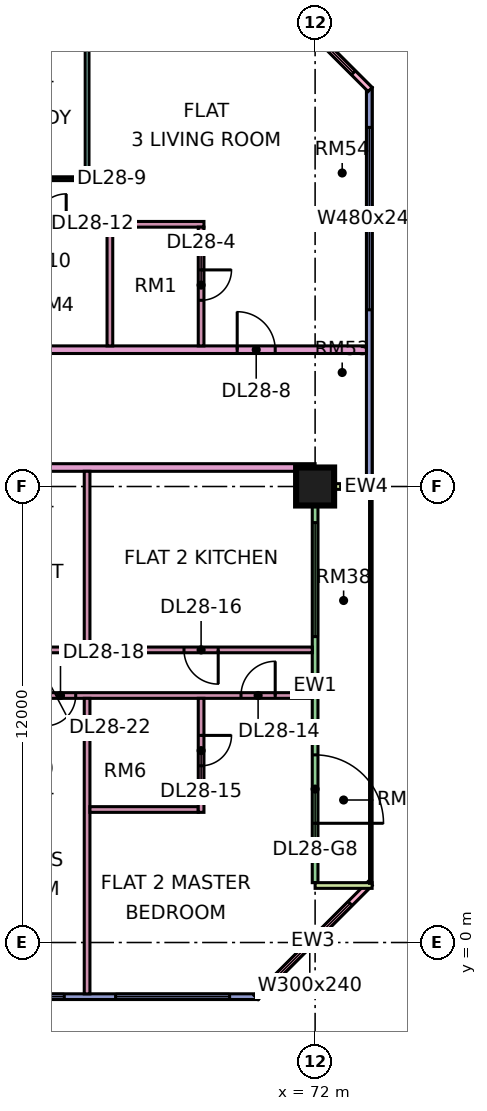
"""IFC4 building model, lengths in metres.
Left out: names, types, materials, properties, quantities, classifications, styles, units other than length and angle.
Written with IfcOpenShell. Run it as: python <this file> out.ifc"""

import sys

from ifc_helpers import new_model, si_unit, direction, frame, frame_2d, origin, origin_2d, place, context, subcontext, project, spatial, rectangle, extrude, element, fill, save


model = new_model("IFC4")
c1 = context("Model", 3, precision=1e-05, world=origin(), true_north=direction((0.0, 1.0)))
c2 = subcontext(c1, "Body", "Model", "MODEL_VIEW")
j1 = project(units=[si_unit("LENGTHUNIT", "METRE"), si_unit("PLANEANGLEUNIT", "RADIAN")], contexts=[c1])
p1 = place(None, origin())
s1 = spatial("IfcSite", under=j1, at=p1, CompositionType="ELEMENT")
p2 = place(p1, origin())
s2 = spatial("IfcBuilding", under=s1, at=p2, CompositionType="ELEMENT")
p3 = place(p2, frame((0.0, 0.0, 121.9)))
s3 = spatial("IfcBuildingStorey", under=s2, at=p3, CompositionType="ELEMENT", Elevation=121.9)
p4 = place(p3, frame((72.0, 12.0, 0.0), z_axis=(0.0, 0.0, 1.0), x_axis=(1.0, 0.0, 0.0)))
e1 = element("IfcColumn", 1, at=p4, inside=s3, PredefinedType="COLUMN", context=c2, shape_type="SweptSolid", body=[
    extrude(rectangle(XDim=1.0, YDim=1.0, at=origin_2d()), origin(), (0.0, 0.0, 1.0), 3.75),
])
p5 = place(p3, frame((60.075, -1.425, 0.0), z_axis=(0.0, 0.0, 1.0), x_axis=(1.0, 0.0, 0.0)))
e2 = element("IfcWall", 2, at=p5, inside=s3, PredefinedType="SOLIDWALL", context=c2, shape_type="SweptSolid", body=[
    extrude(rectangle(XDim=10.425, YDim=0.15, at=frame_2d((5.212, 0.0))), origin(), (0.0, 0.0, 1.0), 3.35),
])
p6 = place(p5, frame((0.562, 0.0, 0.45)))
e3 = element("IfcOpeningElement", 3, at=p6, cuts=e2, PredefinedType="OPENING", context=c2, shape_type="SweptSolid", body=[
    extrude(rectangle(XDim=1.8, YDim=2.4, at=frame_2d((0.9, 1.2))), frame((0.0, 0.085, 0.0), z_axis=(0.0, -1.0, 0.0), x_axis=(1.0, 0.0, 0.0)), (0.0, 0.0, 1.0), 0.17),
])
p7 = place(p5, frame((3.525, 0.0, 0.45)))
e4 = element("IfcOpeningElement", 4, at=p7, cuts=e2, PredefinedType="OPENING", context=c2, shape_type="SweptSolid", body=[
    extrude(rectangle(XDim=1.8, YDim=2.4, at=frame_2d((0.9, 1.2))), frame((0.0, 0.085, 0.0), z_axis=(0.0, -1.0, 0.0), x_axis=(1.0, 0.0, 0.0)), (0.0, 0.0, 1.0), 0.17),
])
p8 = place(p5, frame((6.675, 0.0, 0.45)))
e5 = element("IfcOpeningElement", 5, at=p8, cuts=e2, PredefinedType="OPENING", context=c2, shape_type="SweptSolid", body=[
    extrude(rectangle(XDim=3.0, YDim=2.4, at=frame_2d((1.5, 1.2))), frame((0.0, 0.085, 0.0), z_axis=(0.0, -1.0, 0.0), x_axis=(1.0, 0.0, 0.0)), (0.0, 0.0, 1.0), 0.17),
])
p9 = place(p3, frame((70.447, -1.447, 0.0), z_axis=(0.0, 0.0, 1.0), x_axis=(0.707106781187, 0.707106781187, 0.0)))
e6 = element("IfcWall", 6, at=p9, inside=s3, PredefinedType="SOLIDWALL", context=c2, shape_type="SweptSolid", body=[
    extrude(rectangle(XDim=4.243, YDim=0.15, at=frame_2d((2.121, 0.0))), origin(), (0.0, 0.0, 1.0), 3.35),
])
p10 = place(p9, frame((0.498, 0.0, 0.45)))
e7 = element("IfcOpeningElement", 7, at=p10, cuts=e6, PredefinedType="OPENING", context=c2, shape_type="SweptSolid", body=[
    extrude(rectangle(XDim=3.0, YDim=2.4, at=frame_2d((1.5, 1.2))), frame((0.0, 0.085, 0.0), z_axis=(0.0, -1.0, 0.0), x_axis=(1.0, 0.0, 0.0)), (0.0, 0.0, 1.0), 0.17),
])
p11 = place(p3, frame((72.0, 1.575, 0.0), z_axis=(0.0, 0.0, 1.0), x_axis=(0.0, 1.0, 0.0)))
e8 = element("IfcWall", 8, at=p11, inside=s3, PredefinedType="SOLIDWALL", context=c2, shape_type="SweptSolid", body=[
    extrude(rectangle(XDim=10.35, YDim=0.15, at=frame_2d((5.175, 0.0))), origin(), (0.0, 0.0, 1.0), 3.35),
])
p12 = place(p11, frame((1.562, 0.0, 0.0)))
e9 = element("IfcOpeningElement", 9, at=p12, cuts=e8, PredefinedType="OPENING", context=c2, shape_type="SweptSolid", body=[
    extrude(rectangle(XDim=1.8, YDim=2.4, at=frame_2d((0.9, 1.2))), frame((0.0, 0.085, 0.0), z_axis=(0.0, -1.0, 0.0), x_axis=(1.0, 0.0, 0.0)), (0.0, 0.0, 1.0), 0.17),
])
p13 = place(p11, frame((6.475, 0.0, 0.45)))
e10 = element("IfcOpeningElement", 10, at=p13, cuts=e8, PredefinedType="OPENING", context=c2, shape_type="SweptSolid", body=[
    extrude(rectangle(XDim=3.0, YDim=2.4, at=frame_2d((1.5, 1.2))), frame((0.0, 0.085, 0.0), z_axis=(0.0, -1.0, 0.0), x_axis=(1.0, 0.0, 0.0)), (0.0, 0.0, 1.0), 0.17),
])
for number, where, z_axis, x_axis in (
    (11, (73.5, 1.5, 0.0), (0.0, 0.0, 1.0), (-1.0, 0.0, 0.0)),
    (12, (73.5, 12.0, 0.0), (0.0, 0.0, 1.0), (-1.0, 0.0, 0.0)),
):
    element("IfcWall", number, at=place(p3, frame(where, z_axis=z_axis, x_axis=x_axis)), inside=s3, PredefinedType="SOLIDWALL", context=c2, shape_type="SweptSolid", body=[
        extrude(rectangle(XDim=1.5, YDim=0.15, at=frame_2d((0.75, 0.0))), origin(), (0.0, 0.0, 1.0), 3.35),
    ])
p14 = place(p3, frame((73.425, 12.075, 0.0), z_axis=(0.0, 0.0, 1.0), x_axis=(0.0, 1.0, 0.0)))
e13 = element("IfcWall", 13, at=p14, inside=s3, PredefinedType="SOLIDWALL", context=c2, shape_type="SweptSolid", body=[
    extrude(rectangle(XDim=10.425, YDim=0.15, at=frame_2d((5.212, 0.0))), origin(), (0.0, 0.0, 1.0), 3.35),
])
p15 = place(p14, frame((4.575, 0.0, 0.45)))
e14 = element("IfcOpeningElement", 14, at=p15, cuts=e13, PredefinedType="OPENING", context=c2, shape_type="SweptSolid", body=[
    extrude(rectangle(XDim=4.8, YDim=2.4, at=frame_2d((2.4, 1.2))), frame((0.0, 0.085, 0.0), z_axis=(0.0, -1.0, 0.0), x_axis=(1.0, 0.0, 0.0)), (0.0, 0.0, 1.0), 0.17),
])
p16 = place(p3, frame((73.447, 22.447, 0.0), z_axis=(0.0, 0.0, 1.0), x_axis=(-0.707106781187, 0.707106781187, 0.0)))
e15 = element("IfcWall", 15, at=p16, inside=s3, PredefinedType="SOLIDWALL", context=c2, shape_type="SweptSolid", body=[
    extrude(rectangle(XDim=4.243, YDim=0.15, at=frame_2d((2.121, 0.0))), origin(), (0.0, 0.0, 1.0), 3.35),
])
p17 = place(p16, frame((0.621, 0.0, 0.45)))
e16 = element("IfcOpeningElement", 16, at=p17, cuts=e15, PredefinedType="OPENING", context=c2, shape_type="SweptSolid", body=[
    extrude(rectangle(XDim=3.0, YDim=2.4, at=frame_2d((1.5, 1.2))), frame((0.0, 0.085, 0.0), z_axis=(0.0, -1.0, 0.0), x_axis=(1.0, 0.0, 0.0)), (0.0, 0.0, 1.0), 0.17),
])
p18 = place(p3, frame((40.65, 12.5, 0.0), z_axis=(0.0, 0.0, 1.0), x_axis=(1.0, 0.0, 0.0)))
e17 = element("IfcWall", 17, at=p18, inside=s3, PredefinedType="PARTITIONING", context=c2, shape_type="SweptSolid", body=[
    extrude(rectangle(XDim=31.35, YDim=0.2, at=frame_2d((15.675, 0.0))), origin(), (0.0, 0.0, 1.0), 3.35),
])
p19 = place(p18, frame((20.1, 0.0, 0.0)))
e18 = element("IfcOpeningElement", 18, at=p19, cuts=e17, PredefinedType="OPENING", context=c2, shape_type="SweptSolid", body=[
    extrude(rectangle(XDim=1.0, YDim=2.1, at=frame_2d((0.5, 1.05))), frame((0.0, 0.11, 0.0), z_axis=(0.0, -1.0, 0.0), x_axis=(1.0, 0.0, 0.0)), (0.0, 0.0, 1.0), 0.22),
])
p20 = place(p18, frame((1.05, 0.0, 0.0)))
e19 = element("IfcOpeningElement", 19, at=p20, cuts=e17, PredefinedType="OPENING", context=c2, shape_type="SweptSolid", body=[
    extrude(rectangle(XDim=1.0, YDim=2.1, at=frame_2d((0.5, 1.05))), frame((0.0, 0.11, 0.0), z_axis=(0.0, -1.0, 0.0), x_axis=(1.0, 0.0, 0.0)), (0.0, 0.0, 1.0), 0.22),
])
p21 = place(p3, frame((51.225, 15.6, 0.0), z_axis=(0.0, 0.0, 1.0), x_axis=(1.0, 0.0, 0.0)))
e20 = element("IfcWall", 20, at=p21, inside=s3, PredefinedType="PARTITIONING", context=c2, shape_type="SweptSolid", body=[
    extrude(rectangle(XDim=22.125, YDim=0.2, at=frame_2d((11.062, 0.0))), origin(), (0.0, 0.0, 1.0), 3.35),
])
p22 = place(p21, frame((18.725, 0.0, 0.0)))
e21 = element("IfcOpeningElement", 21, at=p22, cuts=e20, PredefinedType="OPENING", context=c2, shape_type="SweptSolid", body=[
    extrude(rectangle(XDim=1.0, YDim=2.1, at=frame_2d((0.5, 1.05))), frame((0.0, 0.11, 0.0), z_axis=(0.0, -1.0, 0.0), x_axis=(1.0, 0.0, 0.0)), (0.0, 0.0, 1.0), 0.22),
])
p23 = place(p21, frame((0.875, 0.0, 0.0)))
e22 = element("IfcOpeningElement", 22, at=p23, cuts=e20, PredefinedType="OPENING", context=c2, shape_type="SweptSolid", body=[
    extrude(rectangle(XDim=1.0, YDim=2.1, at=frame_2d((0.5, 1.05))), frame((0.0, 0.11, 0.0), z_axis=(0.0, -1.0, 0.0), x_axis=(1.0, 0.0, 0.0)), (0.0, 0.0, 1.0), 0.22),
])
p24 = place(p3, frame((54.1, 18.9, 0.0), z_axis=(0.0, 0.0, 1.0), x_axis=(1.0, 0.0, 0.0)))
e23 = element("IfcWall", 23, at=p24, inside=s3, PredefinedType="PARTITIONING", context=c2, shape_type="SweptSolid", body=[
    extrude(rectangle(XDim=14.975, YDim=0.15, at=frame_2d((7.487, 0.0))), origin(), (0.0, 0.0, 1.0), 3.35),
])
p25 = place(p24, frame((2.3, 0.0, 0.0)))
e24 = element("IfcOpeningElement", 24, at=p25, cuts=e23, PredefinedType="OPENING", context=c2, shape_type="SweptSolid", body=[
    extrude(rectangle(XDim=0.9, YDim=2.1, at=frame_2d((0.45, 1.05))), frame((0.0, 0.085, 0.0), z_axis=(0.0, -1.0, 0.0), x_axis=(1.0, 0.0, 0.0)), (0.0, 0.0, 1.0), 0.17),
])
p26 = place(p24, frame((7.1, 0.0, 0.0)))
e25 = element("IfcOpeningElement", 25, at=p26, cuts=e23, PredefinedType="OPENING", context=c2, shape_type="SweptSolid", body=[
    extrude(rectangle(XDim=0.8, YDim=2.1, at=frame_2d((0.4, 1.05))), frame((0.0, 0.085, 0.0), z_axis=(0.0, -1.0, 0.0), x_axis=(1.0, 0.0, 0.0)), (0.0, 0.0, 1.0), 0.17),
])
p27 = place(p24, frame((10.55, 0.0, 0.0)))
e26 = element("IfcOpeningElement", 26, at=p27, cuts=e23, PredefinedType="OPENING", context=c2, shape_type="SweptSolid", body=[
    extrude(rectangle(XDim=0.8, YDim=2.1, at=frame_2d((0.4, 1.05))), frame((0.0, 0.085, 0.0), z_axis=(0.0, -1.0, 0.0), x_axis=(1.0, 0.0, 0.0)), (0.0, 0.0, 1.0), 0.17),
])
p28 = place(p3, frame((54.1, 20.1, 0.0), z_axis=(0.0, 0.0, 1.0), x_axis=(1.0, 0.0, 0.0)))
e27 = element("IfcWall", 27, at=p28, inside=s3, PredefinedType="PARTITIONING", context=c2, shape_type="SweptSolid", body=[
    extrude(rectangle(XDim=11.95, YDim=0.1, at=frame_2d((5.975, 0.0))), origin(), (0.0, 0.0, 1.0), 3.35),
])
p29 = place(p28, frame((0.95, 0.0, 0.0)))
e28 = element("IfcOpeningElement", 28, at=p29, cuts=e27, PredefinedType="OPENING", context=c2, shape_type="SweptSolid", body=[
    extrude(rectangle(XDim=0.9, YDim=2.1, at=frame_2d((0.45, 1.05))), frame((0.0, 0.06, 0.0), z_axis=(0.0, -1.0, 0.0), x_axis=(1.0, 0.0, 0.0)), (0.0, 0.0, 1.0), 0.12),
])
p30 = place(p28, frame((3.95, 0.0, 0.0)))
e29 = element("IfcOpeningElement", 29, at=p30, cuts=e27, PredefinedType="OPENING", context=c2, shape_type="SweptSolid", body=[
    extrude(rectangle(XDim=0.9, YDim=2.1, at=frame_2d((0.45, 1.05))), frame((0.0, 0.06, 0.0), z_axis=(0.0, -1.0, 0.0), x_axis=(1.0, 0.0, 0.0)), (0.0, 0.0, 1.0), 0.12),
])
p31 = place(p28, frame((6.55, 0.0, 0.0)))
e30 = element("IfcOpeningElement", 30, at=p31, cuts=e27, PredefinedType="OPENING", context=c2, shape_type="SweptSolid", body=[
    extrude(rectangle(XDim=1.6, YDim=2.1, at=frame_2d((0.8, 1.05))), frame((0.0, 0.06, 0.0), z_axis=(0.0, -1.0, 0.0), x_axis=(1.0, 0.0, 0.0)), (0.0, 0.0, 1.0), 0.12),
])
p32 = place(p28, frame((9.95, 0.0, 0.0)))
e31 = element("IfcOpeningElement", 31, at=p32, cuts=e27, PredefinedType="OPENING", context=c2, shape_type="SweptSolid", body=[
    extrude(rectangle(XDim=0.9, YDim=2.1, at=frame_2d((0.45, 1.05))), frame((0.0, 0.06, 0.0), z_axis=(0.0, -1.0, 0.0), x_axis=(1.0, 0.0, 0.0)), (0.0, 0.0, 1.0), 0.12),
])
p33 = place(p3, frame((59.95, 6.5, 0.0), z_axis=(0.0, 0.0, 1.0), x_axis=(1.0, 0.0, 0.0)))
e32 = element("IfcWall", 32, at=p33, inside=s3, PredefinedType="PARTITIONING", context=c2, shape_type="SweptSolid", body=[
    extrude(rectangle(XDim=11.976, YDim=0.15, at=frame_2d((5.988, 0.0))), origin(), (0.0, 0.0, 1.0), 3.35),
])
p34 = place(p33, frame((10.1, 0.0, 0.0)))
e33 = element("IfcOpeningElement", 33, at=p34, cuts=e32, PredefinedType="OPENING", context=c2, shape_type="SweptSolid", body=[
    extrude(rectangle(XDim=0.9, YDim=2.1, at=frame_2d((0.45, 1.05))), frame((0.0, 0.085, 0.0), z_axis=(0.0, -1.0, 0.0), x_axis=(1.0, 0.0, 0.0)), (0.0, 0.0, 1.0), 0.17),
])
p35 = place(p33, frame((4.95, 0.0, 0.0)))
e34 = element("IfcOpeningElement", 34, at=p35, cuts=e32, PredefinedType="OPENING", context=c2, shape_type="SweptSolid", body=[
    extrude(rectangle(XDim=0.8, YDim=2.1, at=frame_2d((0.4, 1.05))), frame((0.0, 0.085, 0.0), z_axis=(0.0, -1.0, 0.0), x_axis=(1.0, 0.0, 0.0)), (0.0, 0.0, 1.0), 0.17),
])
p36 = place(p33, frame((0.8, 0.0, 0.0)))
e35 = element("IfcOpeningElement", 35, at=p36, cuts=e32, PredefinedType="OPENING", context=c2, shape_type="SweptSolid", body=[
    extrude(rectangle(XDim=1.6, YDim=2.1, at=frame_2d((0.8, 1.05))), frame((0.0, 0.085, 0.0), z_axis=(0.0, -1.0, 0.0), x_axis=(1.0, 0.0, 0.0)), (0.0, 0.0, 1.0), 0.17),
])
p37 = place(p3, frame((62.925, 7.7, 0.0), z_axis=(0.0, 0.0, 1.0), x_axis=(1.0, 0.0, 0.0)))
e36 = element("IfcWall", 36, at=p37, inside=s3, PredefinedType="PARTITIONING", context=c2, shape_type="SweptSolid", body=[
    extrude(rectangle(XDim=9.001, YDim=0.15, at=frame_2d((4.5, 0.0))), origin(), (0.0, 0.0, 1.0), 3.35),
])
p38 = place(p37, frame((5.625, 0.0, 0.0)))
e37 = element("IfcOpeningElement", 37, at=p38, cuts=e36, PredefinedType="OPENING", context=c2, shape_type="SweptSolid", body=[
    extrude(rectangle(XDim=0.9, YDim=2.1, at=frame_2d((0.45, 1.05))), frame((0.0, 0.085, 0.0), z_axis=(0.0, -1.0, 0.0), x_axis=(1.0, 0.0, 0.0)), (0.0, 0.0, 1.0), 0.17),
])
p39 = place(p37, frame((1.225, 0.0, 0.0)))
e38 = element("IfcOpeningElement", 38, at=p39, cuts=e36, PredefinedType="OPENING", context=c2, shape_type="SweptSolid", body=[
    extrude(rectangle(XDim=0.8, YDim=2.1, at=frame_2d((0.4, 1.05))), frame((0.0, 0.085, 0.0), z_axis=(0.0, -1.0, 0.0), x_axis=(1.0, 0.0, 0.0)), (0.0, 0.0, 1.0), 0.17),
])
p40 = place(p3, frame((66.0, -1.351, 0.0), z_axis=(0.0, 0.0, 1.0), x_axis=(0.0, 1.0, 0.0)))
e39 = element("IfcWall", 39, at=p40, inside=s3, PredefinedType="PARTITIONING", context=c2, shape_type="SweptSolid", body=[
    extrude(rectangle(XDim=7.776, YDim=0.15, at=frame_2d((3.888, 0.0))), origin(), (0.0, 0.0, 1.0), 3.35),
])
p41 = place(p3, frame((66.0, 7.775, 0.0), z_axis=(0.0, 0.0, 1.0), x_axis=(0.0, 1.0, 0.0)))
e40 = element("IfcWall", 40, at=p41, inside=s3, PredefinedType="PARTITIONING", context=c2, shape_type="SweptSolid", body=[
    extrude(rectangle(XDim=4.625, YDim=0.15, at=frame_2d((2.312, 0.0))), origin(), (0.0, 0.0, 1.0), 3.35),
])
p42 = place(p3, frame((66.0, 20.15, 0.0), z_axis=(0.0, 0.0, 1.0), x_axis=(0.0, 1.0, 0.0)))
e41 = element("IfcWall", 41, at=p42, inside=s3, PredefinedType="PARTITIONING", context=c2, shape_type="SweptSolid", body=[
    extrude(rectangle(XDim=5.2, YDim=0.1, at=frame_2d((2.6, 0.0))), origin(), (0.0, 0.0, 1.0), 3.35),
])
p43 = place(p3, frame((66.075, 3.5, 0.0), z_axis=(0.0, 0.0, 1.0), x_axis=(1.0, 0.0, 0.0)))
e42 = element("IfcWall", 42, at=p43, inside=s3, PredefinedType="PARTITIONING", context=c2, shape_type="SweptSolid", body=[
    extrude(rectangle(XDim=2.85, YDim=0.15, at=frame_2d((1.425, 0.0))), origin(), (0.0, 0.0, 1.0), 3.35),
])
p44 = place(p3, frame((66.6, 15.7, 0.0), z_axis=(0.0, 0.0, 1.0), x_axis=(0.0, 1.0, 0.0)))
e43 = element("IfcWall", 43, at=p44, inside=s3, PredefinedType="PARTITIONING", context=c2, shape_type="SweptSolid", body=[
    extrude(rectangle(XDim=3.125, YDim=0.15, at=frame_2d((1.562, 0.0))), origin(), (0.0, 0.0, 1.0), 3.35),
])
p45 = place(p3, frame((69.0, 3.425, 0.0), z_axis=(0.0, 0.0, 1.0), x_axis=(0.0, 1.0, 0.0)))
e44 = element("IfcWall", 44, at=p45, inside=s3, PredefinedType="PARTITIONING", context=c2, shape_type="SweptSolid", body=[
    extrude(rectangle(XDim=3.0, YDim=0.15, at=frame_2d((1.5, 0.0))), origin(), (0.0, 0.0, 1.0), 3.35),
])
p46 = place(p45, frame((1.225, 0.0, 0.0)))
e45 = element("IfcOpeningElement", 45, at=p46, cuts=e44, PredefinedType="OPENING", context=c2, shape_type="SweptSolid", body=[
    extrude(rectangle(XDim=0.8, YDim=2.1, at=frame_2d((0.4, 1.05))), frame((0.0, 0.085, 0.0), z_axis=(0.0, -1.0, 0.0), x_axis=(1.0, 0.0, 0.0)), (0.0, 0.0, 1.0), 0.17),
])
p47 = place(p3, frame((69.0, 15.7, 0.0), z_axis=(0.0, 0.0, 1.0), x_axis=(0.0, 1.0, 0.0)))
e46 = element("IfcWall", 46, at=p47, inside=s3, PredefinedType="PARTITIONING", context=c2, shape_type="SweptSolid", body=[
    extrude(rectangle(XDim=3.125, YDim=0.15, at=frame_2d((1.562, 0.0))), origin(), (0.0, 0.0, 1.0), 3.35),
])
p48 = place(p47, frame((1.2, 0.0, 0.0)))
e47 = element("IfcOpeningElement", 47, at=p48, cuts=e46, PredefinedType="OPENING", context=c2, shape_type="SweptSolid", body=[
    extrude(rectangle(XDim=0.8, YDim=2.1, at=frame_2d((0.4, 1.05))), frame((0.0, 0.085, 0.0), z_axis=(0.0, -1.0, 0.0), x_axis=(1.0, 0.0, 0.0)), (0.0, 0.0, 1.0), 0.17),
])
p49 = place(p7, origin())
e48 = element("IfcWindow", 48, at=p49, inside=s3, PartitioningType="SINGLE_PANEL", PredefinedType="WINDOW", context=c2, shape_type="SweptSolid", body=[
    extrude(rectangle(XDim=1.8, YDim=2.4, at=frame_2d((0.9, 1.2))), frame((0.0, 0.03, 0.0), z_axis=(0.0, -1.0, 0.0), x_axis=(1.0, 0.0, 0.0)), (0.0, 0.0, 1.0), 0.06),
])
fill(e4, e48)
p50 = place(p8, origin())
e49 = element("IfcWindow", 49, at=p50, inside=s3, PartitioningType="SINGLE_PANEL", PredefinedType="WINDOW", context=c2, shape_type="SweptSolid", body=[
    extrude(rectangle(XDim=3.0, YDim=2.4, at=frame_2d((1.5, 1.2))), frame((0.0, 0.03, 0.0), z_axis=(0.0, -1.0, 0.0), x_axis=(1.0, 0.0, 0.0)), (0.0, 0.0, 1.0), 0.06),
])
fill(e5, e49)
p51 = place(p10, origin())
e50 = element("IfcWindow", 50, at=p51, inside=s3, PartitioningType="SINGLE_PANEL", PredefinedType="WINDOW", context=c2, shape_type="SweptSolid", body=[
    extrude(rectangle(XDim=3.0, YDim=2.4, at=frame_2d((1.5, 1.2))), frame((0.0, 0.03, 0.0), z_axis=(0.0, -1.0, 0.0), x_axis=(1.0, 0.0, 0.0)), (0.0, 0.0, 1.0), 0.06),
])
fill(e7, e50)
p52 = place(p12, frame((1.8, 0.0, 0.0), z_axis=(0.0, 0.0, 1.0), x_axis=(-1.0, 0.0, 0.0)))
e51 = element("IfcDoor", 51, at=p52, inside=s3, OperationType="DOUBLE_DOOR_SINGLE_SWING", PredefinedType="DOOR", context=c2, shape_type="SweptSolid", body=[
    extrude(rectangle(XDim=1.8, YDim=2.4, at=frame_2d((0.9, 1.2))), frame((0.0, 0.025, 0.0), z_axis=(0.0, -1.0, 0.0), x_axis=(1.0, 0.0, 0.0)), (0.0, 0.0, 1.0), 0.05),
])
fill(e9, e51)
p53 = place(p13, origin())
e52 = element("IfcWindow", 52, at=p53, inside=s3, PartitioningType="SINGLE_PANEL", PredefinedType="WINDOW", context=c2, shape_type="SweptSolid", body=[
    extrude(rectangle(XDim=3.0, YDim=2.4, at=frame_2d((1.5, 1.2))), frame((0.0, 0.03, 0.0), z_axis=(0.0, -1.0, 0.0), x_axis=(1.0, 0.0, 0.0)), (0.0, 0.0, 1.0), 0.06),
])
fill(e10, e52)
p54 = place(p15, origin())
e53 = element("IfcWindow", 53, at=p54, inside=s3, PartitioningType="SINGLE_PANEL", PredefinedType="WINDOW", context=c2, shape_type="SweptSolid", body=[
    extrude(rectangle(XDim=4.8, YDim=2.4, at=frame_2d((2.4, 1.2))), frame((0.0, 0.03, 0.0), z_axis=(0.0, -1.0, 0.0), x_axis=(1.0, 0.0, 0.0)), (0.0, 0.0, 1.0), 0.06),
])
fill(e14, e53)
p55 = place(p17, origin())
e54 = element("IfcWindow", 54, at=p55, inside=s3, PartitioningType="SINGLE_PANEL", PredefinedType="WINDOW", context=c2, shape_type="SweptSolid", body=[
    extrude(rectangle(XDim=3.0, YDim=2.4, at=frame_2d((1.5, 1.2))), frame((0.0, 0.03, 0.0), z_axis=(0.0, -1.0, 0.0), x_axis=(1.0, 0.0, 0.0)), (0.0, 0.0, 1.0), 0.06),
])
fill(e16, e54)
p56 = place(p48, origin())
e55 = element("IfcDoor", 55, at=p56, inside=s3, OperationType="SINGLE_SWING_RIGHT", PredefinedType="DOOR", context=c2, shape_type="SweptSolid", body=[
    extrude(rectangle(XDim=0.8, YDim=2.1, at=frame_2d((0.4, 1.05))), frame((0.0, 0.025, 0.0), z_axis=(0.0, -1.0, 0.0), x_axis=(1.0, 0.0, 0.0)), (0.0, 0.0, 1.0), 0.05),
])
fill(e47, e55)
p57 = place(p22, origin())
e56 = element("IfcDoor", 56, at=p57, inside=s3, OperationType="SINGLE_SWING_LEFT", PredefinedType="DOOR", context=c2, shape_type="SweptSolid", body=[
    extrude(rectangle(XDim=1.0, YDim=2.1, at=frame_2d((0.5, 1.05))), frame((0.0, 0.025, 0.0), z_axis=(0.0, -1.0, 0.0), x_axis=(1.0, 0.0, 0.0)), (0.0, 0.0, 1.0), 0.05),
])
fill(e21, e56)
p58 = place(p27, frame((0.8, 0.0, 0.0), z_axis=(0.0, 0.0, 1.0), x_axis=(-1.0, 0.0, 0.0)))
e57 = element("IfcDoor", 57, at=p58, inside=s3, OperationType="SINGLE_SWING_RIGHT", PredefinedType="DOOR", context=c2, shape_type="SweptSolid", body=[
    extrude(rectangle(XDim=0.8, YDim=2.1, at=frame_2d((0.4, 1.05))), frame((0.0, 0.025, 0.0), z_axis=(0.0, -1.0, 0.0), x_axis=(1.0, 0.0, 0.0)), (0.0, 0.0, 1.0), 0.05),
])
fill(e26, e57)
p59 = place(p34, frame((0.9, 0.0, 0.0), z_axis=(0.0, 0.0, 1.0), x_axis=(-1.0, 0.0, 0.0)))
e58 = element("IfcDoor", 58, at=p59, inside=s3, OperationType="SINGLE_SWING_RIGHT", PredefinedType="DOOR", context=c2, shape_type="SweptSolid", body=[
    extrude(rectangle(XDim=0.9, YDim=2.1, at=frame_2d((0.45, 1.05))), frame((0.0, 0.025, 0.0), z_axis=(0.0, -1.0, 0.0), x_axis=(1.0, 0.0, 0.0)), (0.0, 0.0, 1.0), 0.05),
])
fill(e33, e58)
p60 = place(p46, origin())
e59 = element("IfcDoor", 59, at=p60, inside=s3, OperationType="SINGLE_SWING_RIGHT", PredefinedType="DOOR", context=c2, shape_type="SweptSolid", body=[
    extrude(rectangle(XDim=0.8, YDim=2.1, at=frame_2d((0.4, 1.05))), frame((0.0, 0.025, 0.0), z_axis=(0.0, -1.0, 0.0), x_axis=(1.0, 0.0, 0.0)), (0.0, 0.0, 1.0), 0.05),
])
fill(e45, e59)
p61 = place(p38, origin())
e60 = element("IfcDoor", 60, at=p61, inside=s3, OperationType="SINGLE_SWING_RIGHT", PredefinedType="DOOR", context=c2, shape_type="SweptSolid", body=[
    extrude(rectangle(XDim=0.9, YDim=2.1, at=frame_2d((0.45, 1.05))), frame((0.0, 0.025, 0.0), z_axis=(0.0, -1.0, 0.0), x_axis=(1.0, 0.0, 0.0)), (0.0, 0.0, 1.0), 0.05),
])
fill(e37, e60)
p62 = place(p35, frame((0.8, 0.0, 0.0), z_axis=(0.0, 0.0, 1.0), x_axis=(-1.0, 0.0, 0.0)))
e61 = element("IfcDoor", 61, at=p62, inside=s3, OperationType="SINGLE_SWING_LEFT", PredefinedType="DOOR", context=c2, shape_type="SweptSolid", body=[
    extrude(rectangle(XDim=0.8, YDim=2.1, at=frame_2d((0.4, 1.05))), frame((0.0, 0.025, 0.0), z_axis=(0.0, -1.0, 0.0), x_axis=(1.0, 0.0, 0.0)), (0.0, 0.0, 1.0), 0.05),
])
fill(e34, e61)
save(model, sys.argv[1])
